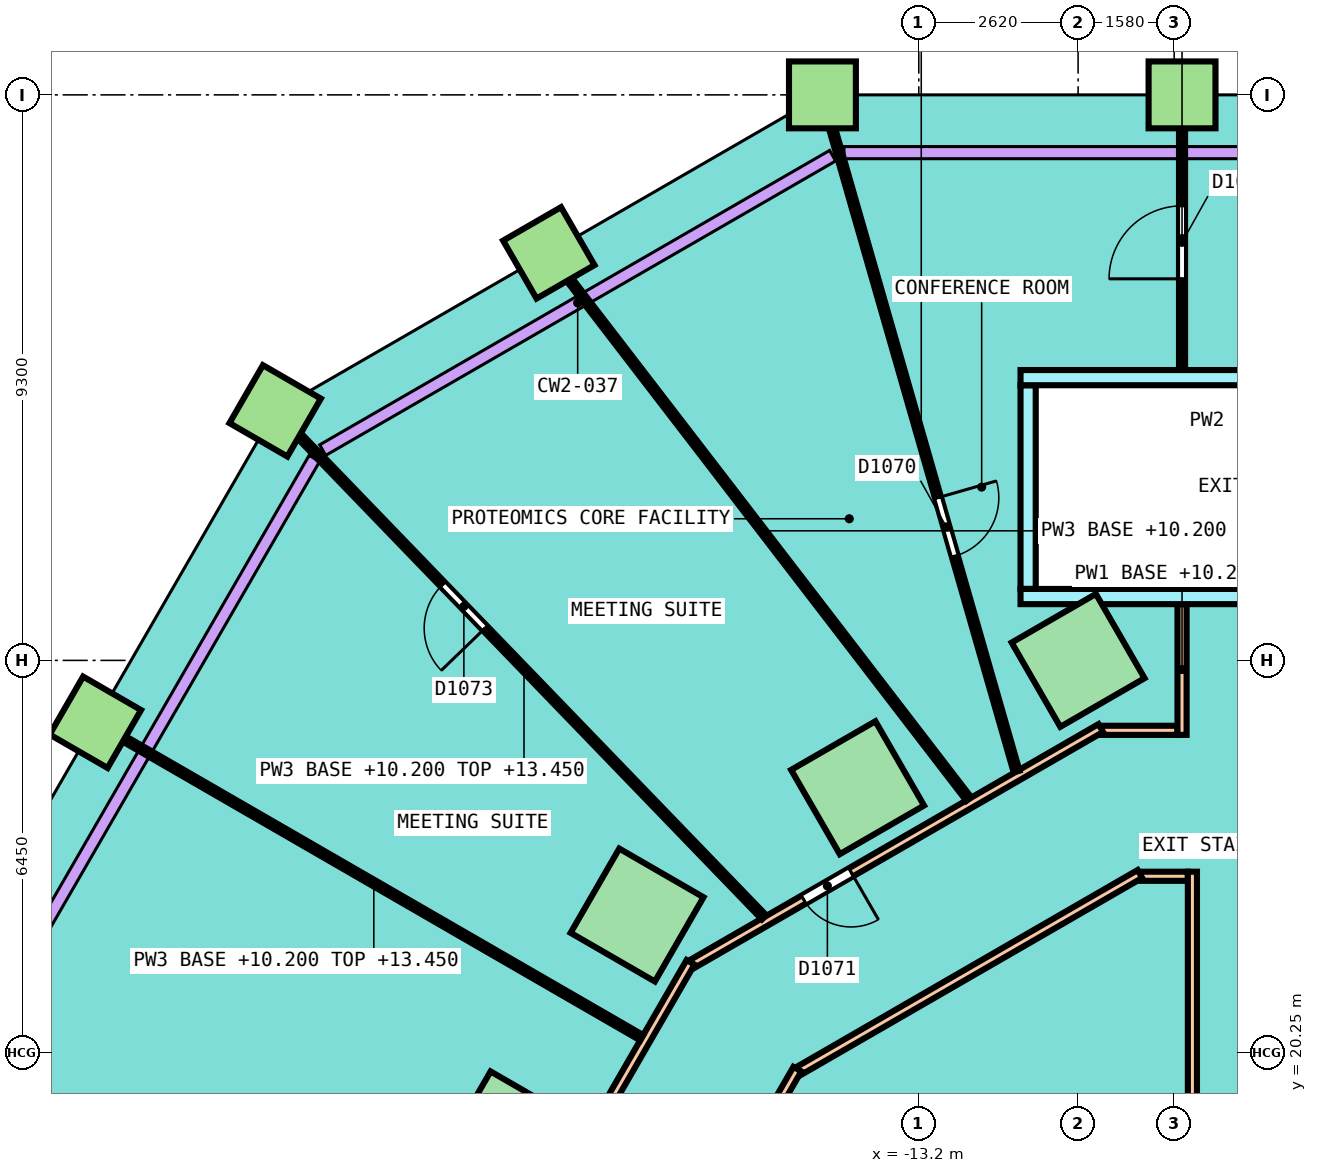
"""IFC4 building model, lengths in metres.
Left out: names, types, materials, properties, quantities, classifications, styles, units other than length and angle.
Written with IfcOpenShell. Run it as: python <this file> out.ifc"""

import sys

from ifc_helpers import new_model, si_unit, direction, frame, frame_2d, origin, origin_2d, place, context, subcontext, project, spatial, rectangle, extrude, element, fill, save


model = new_model("IFC4")
c1 = context("Model", 3, precision=1e-05, world=origin(), true_north=direction((0.0, 1.0)))
c2 = subcontext(c1, "Body", "Model", "MODEL_VIEW")
j1 = project(units=[si_unit("LENGTHUNIT", "METRE"), si_unit("PLANEANGLEUNIT", "RADIAN")], contexts=[c1])
p1 = place(None, origin())
s1 = spatial("IfcSite", under=j1, at=p1, CompositionType="ELEMENT")
p2 = place(p1, origin())
s2 = spatial("IfcBuilding", under=s1, at=p2, CompositionType="ELEMENT")
p3 = place(p2, frame((0.0, 0.0, 10.2)))
s3 = spatial("IfcBuildingStorey", under=s2, at=p3, CompositionType="ELEMENT", Elevation=10.2)
for number, where, z_axis, x_axis in (
    (1, (-10.58, 26.7, 0.0), (0.0, 0.0, 1.0), (-0.866, -0.5, 0.0)),
    (2, (-14.206, 24.606, 0.0), (0.0, 0.0, 1.0), (-0.866, -0.5, 0.0)),
    (3, (-17.833, 22.512, 0.0), (0.0, 0.0, 1.0), (-0.5, -0.866, 0.0)),
    (4, (-19.949, 18.847, 0.0), (0.0, 0.0, 1.0), (-0.5, -0.866, 0.0)),
):
    element("IfcColumn", number, at=place(p3, frame(where, z_axis=z_axis, x_axis=x_axis)), inside=s3, PredefinedType="COLUMN", context=c2, shape_type="SweptSolid", body=[
        extrude(rectangle(XDim=1.6, YDim=1.6, at=origin_2d()), origin(), (0.0, 0.0, 1.0), 4.05),
    ])
for number, where, z_axis, x_axis in (
    (5, (-8.871, 36.0, 0.0), (0.0, 0.0, 1.0), (-1.0, 0.0, 0.0)),
    (6, (-14.785, 36.0, 0.0), (0.0, 0.0, 1.0), (-1.0, 0.0, 0.0)),
    (7, (-19.285, 33.402, 0.0), (0.0, 0.0, 1.0), (-0.866, -0.5, 0.0)),
    (8, (-23.785, 30.804, 0.0), (0.0, 0.0, 1.0), (-0.5, -0.866, 0.0)),
    (9, (-26.741, 25.682, 0.0), (0.0, 0.0, 1.0), (-0.5, -0.866, 0.0)),
):
    element("IfcColumn", number, at=place(p3, frame(where, z_axis=z_axis, x_axis=x_axis)), inside=s3, PredefinedType="COLUMN", context=c2, shape_type="SweptSolid", body=[
        extrude(rectangle(XDim=1.1, YDim=1.1, at=origin_2d()), origin(), (0.0, 0.0, 1.0), 4.05),
    ])
p4 = place(p3, frame((-9.554, 23.15, 0.0), z_axis=(0.0, 0.0, 1.0), x_axis=(1.0, 0.0, 0.0)))
e10 = element("IfcWall", 10, at=p4, inside=s3, PredefinedType="PARTITIONING", context=c2, shape_type="SweptSolid", body=[
    extrude(rectangle(XDim=0.779, YDim=0.15, at=frame_2d((0.389, 0.0))), origin(), (0.0, 0.0, 1.0), 3.05),
])
p5 = place(p3, frame((-10.197, 25.55, 0.0), z_axis=(0.0, 0.0, 1.0), x_axis=(1.0, 0.0, 0.0)))
e11 = element("IfcWall", 11, at=p5, inside=s3, PredefinedType="PARTITIONING", context=c2, shape_type="SweptSolid", body=[
    extrude(rectangle(XDim=1.251, YDim=0.15, at=frame_2d((0.625, 0.0))), origin(), (0.0, 0.0, 1.0), 3.05),
])
p6 = place(p3, frame((-16.926, 21.708, 0.0), z_axis=(0.0, 0.0, 1.0), x_axis=(0.866023143435, 0.50000391502, 0.0)))
e12 = element("IfcWall", 12, at=p6, inside=s3, PredefinedType="PARTITIONING", context=c2, shape_type="SweptSolid", body=[
    extrude(rectangle(XDim=7.759, YDim=0.15, at=frame_2d((3.879, 0.0))), origin(), (0.0, 0.0, 1.0), 3.05),
])
p7 = place(p6, frame((2.117, 0.0, 0.0)))
e13 = element("IfcOpeningElement", 13, at=p7, cuts=e12, PredefinedType="OPENING", context=c2, shape_type="SweptSolid", body=[
    extrude(rectangle(XDim=0.9, YDim=2.1, at=frame_2d((0.45, 1.05))), frame((0.0, 0.085, 0.0), z_axis=(0.0, -1.0, 0.0), x_axis=(1.0, 0.0, 0.0)), (0.0, 0.0, 1.0), 0.17),
])
p8 = place(p3, frame((-8.871, 25.475, 0.0), z_axis=(0.0, 0.0, 1.0), x_axis=(0.0, 1.0, 0.0)))
e14 = element("IfcWall", 14, at=p8, inside=s3, PredefinedType="PARTITIONING", context=c2, shape_type="SweptSolid", body=[
    extrude(rectangle(XDim=2.15, YDim=0.15, at=frame_2d((1.075, 0.0))), origin(), (0.0, 0.0, 1.0), 3.25),
])
p9 = place(p3, frame((-15.169, 19.951, 0.0), z_axis=(0.0, 0.0, 1.0), x_axis=(0.866024786089, 0.500001069878, 0.0)))
e15 = element("IfcWall", 15, at=p9, inside=s3, PredefinedType="PARTITIONING", context=c2, shape_type="SweptSolid", body=[
    extrude(rectangle(XDim=6.473, YDim=0.15, at=frame_2d((3.236, 0.0))), origin(), (0.0, 0.0, 1.0), 3.05),
])
p10 = place(p3, frame((-24.825, 3.301, 0.0), z_axis=(0.0, 0.0, 1.0), x_axis=(0.499992422807, 0.866029778435, 0.0)))
e16 = element("IfcWall", 16, at=p10, inside=s3, PredefinedType="PARTITIONING", context=c2, shape_type="SweptSolid", body=[
    extrude(rectangle(XDim=19.257, YDim=0.15, at=frame_2d((9.628, 0.0))), origin(), (0.0, 0.0, 1.0), 3.05),
])
p11 = place(p10, frame((12.192, 0.0, 0.0)))
e17 = element("IfcOpeningElement", 17, at=p11, cuts=e16, PredefinedType="OPENING", context=c2, shape_type="SweptSolid", body=[
    extrude(rectangle(XDim=1.2, YDim=2.1, at=frame_2d((0.6, 1.05))), frame((0.0, 0.085, 0.0), z_axis=(0.0, -1.0, 0.0), x_axis=(1.0, 0.0, 0.0)), (0.0, 0.0, 1.0), 0.17),
])
p12 = place(p10, frame((2.097, 0.0, 0.0)))
e18 = element("IfcOpeningElement", 18, at=p12, cuts=e16, PredefinedType="OPENING", context=c2, shape_type="SweptSolid", body=[
    extrude(rectangle(XDim=1.0, YDim=2.1, at=frame_2d((0.5, 1.05))), frame((0.0, 0.085, 0.0), z_axis=(0.0, -1.0, 0.0), x_axis=(1.0, 0.0, 0.0)), (0.0, 0.0, 1.0), 0.17),
])
p13 = place(p3, frame((-27.225, 3.944, 0.0), z_axis=(0.0, 0.0, 1.0), x_axis=(0.499997805905, 0.866026670542, 0.0)))
e19 = element("IfcWall", 19, at=p13, inside=s3, PredefinedType="PARTITIONING", context=c2, shape_type="SweptSolid", body=[
    extrude(rectangle(XDim=20.543, YDim=0.15, at=frame_2d((10.272, 0.0))), origin(), (0.0, 0.0, 1.0), 3.05),
])
p14 = place(p13, frame((13.998, 0.0, 0.0)))
e20 = element("IfcOpeningElement", 20, at=p14, cuts=e19, PredefinedType="OPENING", context=c2, shape_type="SweptSolid", body=[
    extrude(rectangle(XDim=1.0, YDim=2.1, at=frame_2d((0.5, 1.05))), frame((0.0, 0.085, 0.0), z_axis=(0.0, -1.0, 0.0), x_axis=(1.0, 0.0, 0.0)), (0.0, 0.0, 1.0), 0.17),
])
p15 = place(p13, frame((4.663, 0.0, 0.0)))
e21 = element("IfcOpeningElement", 21, at=p15, cuts=e19, PredefinedType="OPENING", context=c2, shape_type="SweptSolid", body=[
    extrude(rectangle(XDim=1.2, YDim=2.1, at=frame_2d((0.6, 1.05))), frame((0.0, 0.085, 0.0), z_axis=(0.0, -1.0, 0.0), x_axis=(1.0, 0.0, 0.0)), (0.0, 0.0, 1.0), 0.17),
])
p16 = place(p3, frame((-8.7, 14.325, 0.0), z_axis=(0.0, 0.0, 1.0), x_axis=(0.0, 1.0, 0.0)))
e22 = element("IfcWall", 22, at=p16, inside=s3, PredefinedType="PARTITIONING", context=c2, shape_type="SweptSolid", body=[
    extrude(rectangle(XDim=8.9, YDim=0.15, at=frame_2d((4.45, 0.0))), origin(), (0.0, 0.0, 1.0), 3.05),
])
p17 = place(p3, frame((-8.871, 31.475, 0.0), z_axis=(0.0, 0.0, 1.0), x_axis=(0.0, 1.0, 0.0)))
e23 = element("IfcWall", 23, at=p17, inside=s3, PredefinedType="PARTITIONING", context=c2, shape_type="SweptSolid", body=[
    extrude(rectangle(XDim=4.325, YDim=0.1, at=frame_2d((2.163, 0.0))), origin(), (0.0, 0.0, 1.0), 4.0),
])
p18 = place(p17, frame((1.5, 0.0, 0.0)))
e24 = element("IfcOpeningElement", 24, at=p18, cuts=e23, PredefinedType="OPENING", context=c2, shape_type="SweptSolid", body=[
    extrude(rectangle(XDim=1.2, YDim=2.1, at=frame_2d((0.6, 1.05))), frame((0.0, 0.06, 0.0), z_axis=(0.0, -1.0, 0.0), x_axis=(1.0, 0.0, 0.0)), (0.0, 0.0, 1.0), 0.12),
])
p19 = place(p3, frame((-14.727, 35.8, 0.0), z_axis=(0.0, 0.0, 1.0), x_axis=(0.27581573325, -0.96121052912, 0.0)))
e25 = element("IfcWall", 25, at=p19, inside=s3, PredefinedType="PARTITIONING", context=c2, shape_type="SweptSolid", body=[
    extrude(rectangle(XDim=11.369, YDim=0.1, at=frame_2d((5.685, 0.0))), origin(), (0.0, 0.0, 1.0), 3.25),
])
p20 = place(p19, frame((6.684, 0.0, 0.0)))
e26 = element("IfcOpeningElement", 26, at=p20, cuts=e25, PredefinedType="OPENING", context=c2, shape_type="SweptSolid", body=[
    extrude(rectangle(XDim=1.0, YDim=2.1, at=frame_2d((0.5, 1.05))), frame((0.0, 0.06, 0.0), z_axis=(0.0, -1.0, 0.0), x_axis=(1.0, 0.0, 0.0)), (0.0, 0.0, 1.0), 0.12),
])
p21 = place(p3, frame((-19.162, 33.242, 0.0), z_axis=(0.0, 0.0, 1.0), x_axis=(0.609546416877, -0.79275038043, 0.0)))
e27 = element("IfcWall", 27, at=p21, inside=s3, PredefinedType="PARTITIONING", context=c2, shape_type="SweptSolid", body=[
    extrude(rectangle(XDim=11.129, YDim=0.1, at=frame_2d((5.564, 0.0))), origin(), (0.0, 0.0, 1.0), 3.2),
])
p22 = place(p3, frame((-23.64, 30.654, 0.0), z_axis=(0.0, 0.0, 1.0), x_axis=(0.694530893364, -0.719462881713, 0.0)))
e28 = element("IfcWall", 28, at=p22, inside=s3, PredefinedType="PARTITIONING", context=c2, shape_type="SweptSolid", body=[
    extrude(rectangle(XDim=11.369, YDim=0.1, at=frame_2d((5.685, 0.0))), origin(), (0.0, 0.0, 1.0), 3.25),
])
p23 = place(p22, frame((3.76, 0.0, 0.0)))
e29 = element("IfcOpeningElement", 29, at=p23, cuts=e28, PredefinedType="OPENING", context=c2, shape_type="SweptSolid", body=[
    extrude(rectangle(XDim=1.0, YDim=2.1, at=frame_2d((0.5, 1.05))), frame((0.0, 0.06, 0.0), z_axis=(0.0, -1.0, 0.0), x_axis=(1.0, 0.0, 0.0)), (0.0, 0.0, 1.0), 0.12),
])
p24 = place(p3, frame((-26.568, 25.582, 0.0), z_axis=(0.0, 0.0, 1.0), x_axis=(0.866028554658, -0.499994542487, 0.0)))
e30 = element("IfcWall", 30, at=p24, inside=s3, PredefinedType="PARTITIONING", context=c2, shape_type="SweptSolid", body=[
    extrude(rectangle(XDim=10.175, YDim=0.1, at=frame_2d((5.087, 0.0))), origin(), (0.0, 0.0, 1.0), 3.25),
])
p25 = place(p3, frame((-11.402, 27.875, 0.0), z_axis=(0.0, 0.0, 1.0), x_axis=(0.0, 1.0, 0.0)))
e31 = element("IfcWall", 31, at=p25, inside=s3, PredefinedType="SOLIDWALL", context=c2, shape_type="SweptSolid", body=[
    extrude(rectangle(XDim=3.35, YDim=0.25, at=frame_2d((1.675, 0.0))), origin(), (0.0, 0.0, 1.0), 3.2),
])
p26 = place(p3, frame((-11.527, 31.35, 0.0), z_axis=(0.0, 0.0, 1.0), x_axis=(1.0, 0.0, 0.0)))
e32 = element("IfcWall", 32, at=p26, inside=s3, PredefinedType="SOLIDWALL", context=c2, shape_type="SweptSolid", body=[
    extrude(rectangle(XDim=8.422, YDim=0.25, at=frame_2d((4.211, 0.0))), origin(), (0.0, 0.0, 1.0), 3.2),
])
p27 = place(p3, frame((-11.527, 27.75, 0.0), z_axis=(0.0, 0.0, 1.0), x_axis=(1.0, 0.0, 0.0)))
e33 = element("IfcWall", 33, at=p27, inside=s3, PredefinedType="SOLIDWALL", context=c2, shape_type="SweptSolid", body=[
    extrude(rectangle(XDim=8.495, YDim=0.25, at=frame_2d((4.248, 0.0))), origin(), (0.0, 0.0, 1.0), 3.2),
])
p28 = place(p27, frame((6.695, 0.0, 0.0)))
e34 = element("IfcOpeningElement", 34, at=p28, cuts=e33, PredefinedType="OPENING", context=c2, shape_type="SweptSolid", body=[
    extrude(rectangle(XDim=1.2, YDim=2.1, at=frame_2d((0.6, 1.05))), frame((0.0, 0.135, 0.0), z_axis=(0.0, -1.0, 0.0), x_axis=(1.0, 0.0, 0.0)), (0.0, 0.0, 1.0), 0.27),
])
p29 = place(p18, origin())
e35 = element("IfcDoor", 35, at=p29, inside=s3, OperationType="DOUBLE_DOOR_SINGLE_SWING", PredefinedType="DOOR", context=c2, shape_type="SweptSolid", body=[
    extrude(rectangle(XDim=1.2, YDim=2.1, at=frame_2d((0.6, 1.05))), frame((0.0, 0.025, 0.0), z_axis=(0.0, -1.0, 0.0), x_axis=(1.0, 0.0, 0.0)), (0.0, 0.0, 1.0), 0.05),
])
fill(e24, e35)
p30 = place(p20, origin())
e36 = element("IfcDoor", 36, at=p30, inside=s3, OperationType="SINGLE_SWING_LEFT", PredefinedType="DOOR", context=c2, shape_type="SweptSolid", body=[
    extrude(rectangle(XDim=1.0, YDim=2.1, at=frame_2d((0.5, 1.05))), frame((0.0, 0.025, 0.0), z_axis=(0.0, -1.0, 0.0), x_axis=(1.0, 0.0, 0.0)), (0.0, 0.0, 1.0), 0.05),
])
fill(e26, e36)
p31 = place(p7, origin())
e37 = element("IfcDoor", 37, at=p31, inside=s3, OperationType="SINGLE_SWING_RIGHT", PredefinedType="DOOR", context=c2, shape_type="SweptSolid", body=[
    extrude(rectangle(XDim=0.9, YDim=2.1, at=frame_2d((0.45, 1.05))), frame((0.0, 0.025, 0.0), z_axis=(0.0, -1.0, 0.0), x_axis=(1.0, 0.0, 0.0)), (0.0, 0.0, 1.0), 0.05),
])
fill(e13, e37)
p32 = place(p23, origin())
e38 = element("IfcDoor", 38, at=p32, inside=s3, OperationType="SINGLE_SWING_RIGHT", PredefinedType="DOOR", context=c2, shape_type="SweptSolid", body=[
    extrude(rectangle(XDim=1.0, YDim=2.1, at=frame_2d((0.5, 1.05))), frame((0.0, 0.025, 0.0), z_axis=(0.0, -1.0, 0.0), x_axis=(1.0, 0.0, 0.0)), (0.0, 0.0, 1.0), 0.05),
])
fill(e29, e38)
save(model, sys.argv[1])
